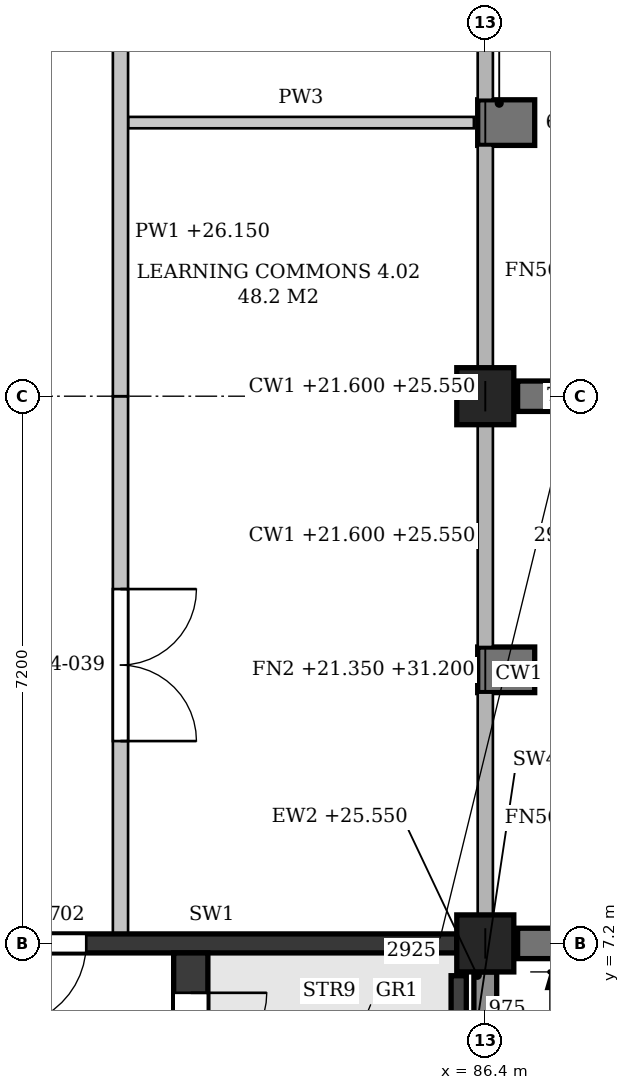
"""IFC4 building model, lengths in metres.
Left out: names, types, materials, properties, quantities, classifications, styles, units other than length and angle.
Written with IfcOpenShell. Run it as: python <this file> out.ifc"""

import sys

from ifc_helpers import new_model, si_unit, direction, frame, frame_2d, origin, origin_2d, place, context, subcontext, project, spatial, polyline, rectangle, outline, extrude, element, fill, save


model = new_model("IFC4")
c1 = context("Model", 3, precision=1e-05, world=origin(), true_north=direction((0.0, 1.0)))
c2 = subcontext(c1, "Body", "Model", "MODEL_VIEW")
j1 = project(units=[si_unit("LENGTHUNIT", "METRE"), si_unit("PLANEANGLEUNIT", "RADIAN")], contexts=[c1])
p1 = place(None, origin())
s1 = spatial("IfcSite", under=j1, at=p1, CompositionType="ELEMENT")
p2 = place(p1, origin())
s2 = spatial("IfcBuilding", under=s1, at=p2, CompositionType="ELEMENT")
p3 = place(p2, frame((0.0, 0.0, 21.6)))
s3 = spatial("IfcBuildingStorey", under=s2, at=p3, CompositionType="ELEMENT", Elevation=21.6)
for number, where, z_axis, x_axis in (
    (1, (86.4, 7.2, 0.0), (0.0, 0.0, 1.0), (1.0, 0.0, 0.0)),
    (2, (86.4, 14.4, 0.0), (0.0, 0.0, 1.0), (1.0, 0.0, 0.0)),
):
    element("IfcColumn", number, at=place(p3, frame(where, z_axis=z_axis, x_axis=x_axis)), inside=s3, PredefinedType="COLUMN", context=c2, shape_type="SweptSolid", body=[
        extrude(rectangle(XDim=0.75, YDim=0.75, at=origin_2d()), origin(), (0.0, 0.0, 1.0), 4.8),
    ])
p4 = place(p3, frame((86.4, 0.375, 0.0), z_axis=(0.0, 0.0, 1.0), x_axis=(0.0, 1.0, 0.0)))
e3 = element("IfcWall", 3, at=p4, inside=s3, PredefinedType="STANDARD", context=c2, shape_type="SweptSolid", body=[
    extrude(rectangle(XDim=6.45, YDim=0.3, at=frame_2d((3.225, 0.0))), origin(), (0.0, 0.0, 1.0), 3.95),
])
p5 = place(p4, frame((0.975, 0.0, 0.9)))
e4 = element("IfcOpeningElement", 4, at=p5, cuts=e3, PredefinedType="OPENING", context=c2, shape_type="SweptSolid", body=[
    extrude(outline(polyline([(0.0, 0.0), (0.9, 0.0), (0.9, 2.05), (0.45, 2.5), (0.0, 2.05), (0.0, 0.0)])), frame((0.0, 0.16, 0.0), z_axis=(0.0, -1.0, 0.0), x_axis=(1.0, 0.0, 0.0)), (0.0, 0.0, 1.0), 0.32),
])
p6 = place(p4, frame((4.575, 0.0, 0.9)))
e5 = element("IfcOpeningElement", 5, at=p6, cuts=e3, PredefinedType="OPENING", context=c2, shape_type="SweptSolid", body=[
    extrude(outline(polyline([(0.0, 0.0), (0.9, 0.0), (0.9, 2.05), (0.45, 2.5), (0.0, 2.05), (0.0, 0.0)])), frame((0.0, 0.16, 0.0), z_axis=(0.0, -1.0, 0.0), x_axis=(1.0, 0.0, 0.0)), (0.0, 0.0, 1.0), 0.32),
])
for number, where, z_axis, x_axis in (
    (6, (86.3, 10.8, -0.25), (0.0, 0.0, 1.0), (1.0, 0.0, 0.0)),
    (7, (86.3, 18.0, -0.25), (0.0, 0.0, 1.0), (1.0, 0.0, 0.0)),
):
    element("IfcWall", number, at=place(p3, frame(where, z_axis=z_axis, x_axis=x_axis)), inside=s3, PredefinedType="POLYGONAL", context=c2, shape_type="SweptSolid", body=[
        extrude(outline(polyline([(0.75, 0.0), (0.75, 9.4), (0.45, 9.85), (0.3, 9.85), (0.3, 8.95), (0.0, 8.95), (0.0, 5.05), (0.35, 5.05), (0.35, 4.2), (0.0, 4.2), (0.0, 0.25), (0.35, 0.25), (0.35, 0.0), (0.75, 0.0)])), frame((0.0, 0.3, 0.0), z_axis=(0.0, -1.0, 0.0), x_axis=(1.0, 0.0, 0.0)), (0.0, 0.0, 1.0), 0.6),
    ])
for number, where, z_axis, x_axis in (
    (8, (86.825, 7.2, -0.25), (0.0, 0.0, 1.0), (1.0, 0.0, 0.0)),
    (9, (86.825, 14.4, -0.25), (0.0, 0.0, 1.0), (1.0, 0.0, 0.0)),
):
    element("IfcWall", number, at=place(p3, frame(where, z_axis=z_axis, x_axis=x_axis)), inside=s3, PredefinedType="POLYGONAL", context=c2, shape_type="SweptSolid", body=[
        extrude(outline(polyline([(0.85, 0.0), (0.85, 8.8), (0.15, 9.85), (0.0, 9.85), (0.0, 0.0), (0.85, 0.0)])), frame((0.0, 0.2, 0.0), z_axis=(0.0, -1.0, 0.0), x_axis=(1.0, 0.0, 0.0)), (0.0, 0.0, 1.0), 0.4),
    ])
p7 = place(p3, frame((79.575, 7.2, 0.0), z_axis=(0.0, 0.0, 1.0), x_axis=(1.0, 0.0, 0.0)))
e10 = element("IfcWall", 10, at=p7, inside=s3, PredefinedType="SHEAR", context=c2, shape_type="SweptSolid", body=[
    extrude(rectangle(XDim=6.45, YDim=0.25, at=frame_2d((3.225, 0.0))), origin(), (0.0, 0.0, 1.0), 3.8),
])
p8 = place(p7, frame((0.475, 0.0, 0.0)))
e11 = element("IfcOpeningElement", 11, at=p8, cuts=e10, PredefinedType="OPENING", context=c2, shape_type="SweptSolid", body=[
    extrude(rectangle(XDim=1.1, YDim=2.1, at=frame_2d((0.55, 1.05))), frame((0.0, 0.135, 0.0), z_axis=(0.0, -1.0, 0.0), x_axis=(1.0, 0.0, 0.0)), (0.0, 0.0, 1.0), 0.27),
])
p9 = place(p3, frame((86.05, 5.85, -0.25), z_axis=(0.0, 0.0, 1.0), x_axis=(0.0, 1.0, 0.0)))
e12 = element("IfcWall", 12, at=p9, inside=s3, PredefinedType="SHEAR", context=c2, shape_type="SweptSolid", body=[
    extrude(rectangle(XDim=0.925, YDim=0.2, at=frame_2d((0.462, 0.0))), origin(), (0.0, 0.0, 1.0), 4.8),
])
p10 = place(p3, frame((82.525, 0.225, 0.0), z_axis=(0.0, 0.0, 1.0), x_axis=(0.0, 1.0, 0.0)))
e13 = element("IfcWall", 13, at=p10, inside=s3, PredefinedType="SHEAR", context=c2, shape_type="SweptSolid", body=[
    extrude(rectangle(XDim=6.85, YDim=0.45, at=frame_2d((3.425, 0.0))), origin(), (0.0, 0.0, 1.0), 4.55),
])
p11 = place(p10, frame((5.325, 0.0, 0.0)))
e14 = element("IfcOpeningElement", 14, at=p11, cuts=e13, PredefinedType="OPENING", context=c2, shape_type="SweptSolid", body=[
    extrude(rectangle(XDim=1.0, YDim=2.1, at=frame_2d((0.5, 1.05))), frame((0.0, 0.235, 0.0), z_axis=(0.0, -1.0, 0.0), x_axis=(1.0, 0.0, 0.0)), (0.0, 0.0, 1.0), 0.47),
])
p12 = place(p3, frame((81.7, 18.0, 0.0), z_axis=(0.0, 0.0, 1.0), x_axis=(1.0, 0.0, 0.0)))
e15 = element("IfcWall", 15, at=p12, inside=s3, PredefinedType="PARTITIONING", context=c2, shape_type="SweptSolid", body=[
    extrude(rectangle(XDim=4.55, YDim=0.15, at=frame_2d((2.275, 0.0))), origin(), (0.0, 0.0, 1.0), 3.8),
])
p13 = place(p3, frame((81.6, 7.325, 0.0), z_axis=(0.0, 0.0, 1.0), x_axis=(0.0, 1.0, 0.0)))
e16 = element("IfcWall", 16, at=p13, inside=s3, PredefinedType="PARTITIONING", context=c2, shape_type="SweptSolid", body=[
    extrude(outline(polyline([(0.0, 0.0), (7.075, 0.0), (7.075, 3.8), (6.825, 3.8), (6.825, 4.55), (0.125, 4.55), (0.125, 3.8), (0.0, 3.8), (0.0, 0.0)])), frame((0.0, 0.1, 0.0), z_axis=(0.0, -1.0, 0.0), x_axis=(1.0, 0.0, 0.0)), (0.0, 0.0, 1.0), 0.2),
])
p14 = place(p13, frame((2.537, 0.0, 0.0)))
e17 = element("IfcOpeningElement", 17, at=p14, cuts=e16, PredefinedType="OPENING", context=c2, shape_type="SweptSolid", body=[
    extrude(rectangle(XDim=2.0, YDim=2.1, at=frame_2d((1.0, 1.05))), frame((0.0, 0.11, 0.0), z_axis=(0.0, -1.0, 0.0), x_axis=(1.0, 0.0, 0.0)), (0.0, 0.0, 1.0), 0.22),
])
p15 = place(p3, frame((81.6, 14.4, 0.0), z_axis=(0.0, 0.0, 1.0), x_axis=(0.0, 1.0, 0.0)))
e18 = element("IfcWall", 18, at=p15, inside=s3, PredefinedType="PARTITIONING", context=c2, shape_type="SweptSolid", body=[
    extrude(outline(polyline([(0.0, 0.0), (7.2, 0.0), (7.2, 3.8), (6.95, 3.8), (6.95, 4.55), (0.25, 4.55), (0.25, 3.8), (0.0, 3.8), (0.0, 0.0)])), frame((0.0, 0.1, 0.0), z_axis=(0.0, -1.0, 0.0), x_axis=(1.0, 0.0, 0.0)), (0.0, 0.0, 1.0), 0.2),
])
p16 = place(p11, frame((1.0, 0.0, 0.0), z_axis=(0.0, 0.0, 1.0), x_axis=(-1.0, 0.0, 0.0)))
e19 = element("IfcDoor", 19, at=p16, inside=s3, OperationType="SINGLE_SWING_LEFT", PredefinedType="DOOR", context=c2, shape_type="SweptSolid", body=[
    extrude(rectangle(XDim=1.0, YDim=2.1, at=frame_2d((0.5, 1.05))), frame((0.0, 0.025, 0.0), z_axis=(0.0, -1.0, 0.0), x_axis=(1.0, 0.0, 0.0)), (0.0, 0.0, 1.0), 0.05),
])
fill(e14, e19)
p17 = place(p8, frame((1.1, 0.0, 0.0), z_axis=(0.0, 0.0, 1.0), x_axis=(-1.0, 0.0, 0.0)))
e20 = element("IfcDoor", 20, at=p17, inside=s3, OperationType="SINGLE_SWING_RIGHT", PredefinedType="DOOR", context=c2, shape_type="SweptSolid", body=[
    extrude(rectangle(XDim=1.1, YDim=2.1, at=frame_2d((0.55, 1.05))), frame((0.0, 0.025, 0.0), z_axis=(0.0, -1.0, 0.0), x_axis=(1.0, 0.0, 0.0)), (0.0, 0.0, 1.0), 0.05),
])
fill(e11, e20)
p18 = place(p14, origin())
e21 = element("IfcDoor", 21, at=p18, inside=s3, OperationType="DOUBLE_DOOR_SINGLE_SWING", PredefinedType="DOOR", context=c2, shape_type="SweptSolid", body=[
    extrude(rectangle(XDim=2.0, YDim=2.1, at=frame_2d((1.0, 1.05))), frame((0.0, 0.025, 0.0), z_axis=(0.0, -1.0, 0.0), x_axis=(1.0, 0.0, 0.0)), (0.0, 0.0, 1.0), 0.05),
])
fill(e17, e21)
save(model, sys.argv[1])
